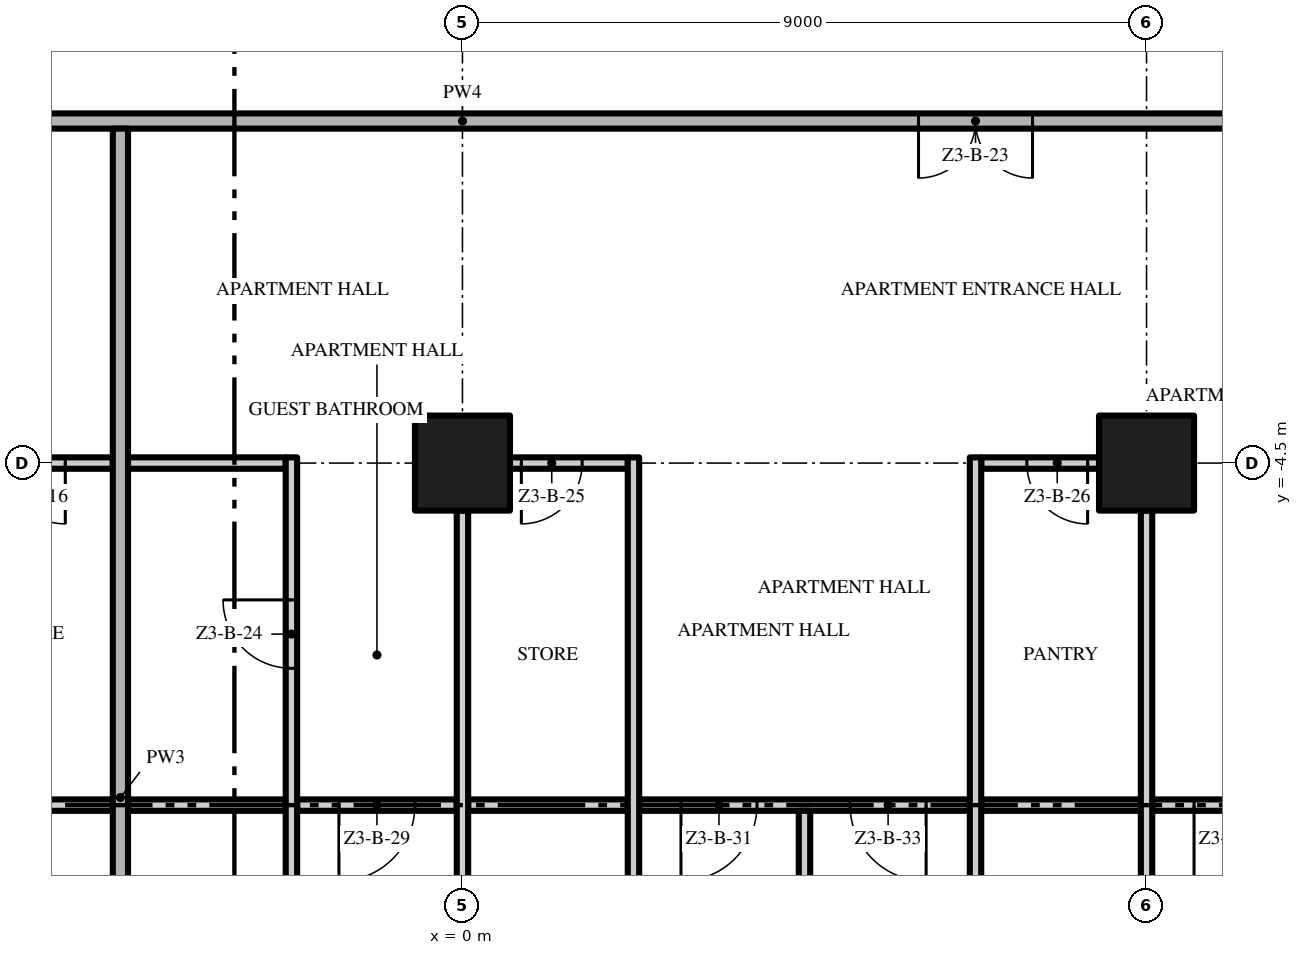
"""IFC4 building model, lengths in metres.
Left out: names, types, materials, properties, quantities, classifications, styles, units other than length and angle.
Written with IfcOpenShell. Run it as: python <this file> out.ifc"""

import sys

from ifc_helpers import new_model, si_unit, direction, frame, frame_2d, origin, origin_2d, place, context, subcontext, project, spatial, rectangle, extrude, element, fill, save


model = new_model("IFC4")
c1 = context("Model", 3, precision=1e-05, world=origin(), true_north=direction((0.0, 1.0)))
c2 = subcontext(c1, "Body", "Model", "MODEL_VIEW")
j1 = project(units=[si_unit("LENGTHUNIT", "METRE"), si_unit("PLANEANGLEUNIT", "RADIAN")], contexts=[c1])
p1 = place(None, origin())
s1 = spatial("IfcSite", under=j1, at=p1, CompositionType="ELEMENT")
p2 = place(p1, origin())
s2 = spatial("IfcBuilding", under=s1, at=p2, CompositionType="ELEMENT")
p3 = place(p2, frame((0.0, 0.0, 144.0)))
s3 = spatial("IfcBuildingStorey", under=s2, at=p3, CompositionType="ELEMENT", Elevation=144.0)
for number, where, z_axis, x_axis in (
    (1, (0.0, -4.5, 0.0), (0.0, 0.0, 1.0), (1.0, 0.0, 0.0)),
    (2, (9.0, -4.5, 0.0), (0.0, 0.0, 1.0), (1.0, 0.0, 0.0)),
):
    element("IfcColumn", number, at=place(p3, frame(where, z_axis=z_axis, x_axis=x_axis)), inside=s3, PredefinedType="COLUMN", context=c2, shape_type="SweptSolid", body=[
        extrude(rectangle(XDim=1.25, YDim=1.25, at=origin_2d()), origin(), (0.0, 0.0, 1.0), 3.5),
    ])
for number, where, z_axis, x_axis in (
    (3, (-6.675, -9.0, 0.0), (0.0, 0.0, 1.0), (1.0, 0.0, 0.0)),
    (4, (-4.4, -9.0, 0.0), (0.0, 0.0, 1.0), (1.0, 0.0, 0.0)),
):
    element("IfcWall", number, at=place(p3, frame(where, z_axis=z_axis, x_axis=x_axis)), inside=s3, PredefinedType="PARTITIONING", context=c2, shape_type="SweptSolid", body=[
        extrude(rectangle(XDim=2.075, YDim=0.15, at=frame_2d((1.038, 0.0))), origin(), (0.0, 0.0, 1.0), 3.5),
    ])
p4 = place(p3, frame((-0.075, -9.0, 0.0), z_axis=(0.0, 0.0, 1.0), x_axis=(-1.0, 0.0, 0.0)))
e5 = element("IfcWall", 5, at=p4, inside=s3, PredefinedType="PARTITIONING", context=c2, shape_type="SweptSolid", body=[
    extrude(rectangle(XDim=2.1, YDim=0.15, at=frame_2d((1.05, 0.0))), origin(), (0.0, 0.0, 1.0), 3.5),
])
p5 = place(p4, frame((0.55, 0.0, 0.0)))
e6 = element("IfcOpeningElement", 6, at=p5, cuts=e5, PredefinedType="OPENING", context=c2, shape_type="SweptSolid", body=[
    extrude(rectangle(XDim=1.0, YDim=2.4, at=frame_2d((0.5, 1.2))), frame((0.0, 0.085, 0.0), z_axis=(0.0, -1.0, 0.0), x_axis=(1.0, 0.0, 0.0)), (0.0, 0.0, 1.0), 0.17),
])
p6 = place(p3, frame((0.075, -9.0, 0.0), z_axis=(0.0, 0.0, 1.0), x_axis=(1.0, 0.0, 0.0)))
e7 = element("IfcWall", 7, at=p6, inside=s3, PredefinedType="PARTITIONING", context=c2, shape_type="SweptSolid", body=[
    extrude(rectangle(XDim=2.1, YDim=0.15, at=frame_2d((1.05, 0.0))), origin(), (0.0, 0.0, 1.0), 3.5),
])
p7 = place(p3, frame((6.675, -9.0, 0.0), z_axis=(0.0, 0.0, 1.0), x_axis=(-1.0, 0.0, 0.0)))
e8 = element("IfcWall", 8, at=p7, inside=s3, PredefinedType="PARTITIONING", context=c2, shape_type="SweptSolid", body=[
    extrude(rectangle(XDim=4.35, YDim=0.15, at=frame_2d((2.175, 0.0))), origin(), (0.0, 0.0, 1.0), 3.5),
])
p8 = place(p7, frame((2.8, 0.0, 0.0)))
e9 = element("IfcOpeningElement", 9, at=p8, cuts=e8, PredefinedType="OPENING", context=c2, shape_type="SweptSolid", body=[
    extrude(rectangle(XDim=1.0, YDim=2.4, at=frame_2d((0.5, 1.2))), frame((0.0, 0.085, 0.0), z_axis=(0.0, -1.0, 0.0), x_axis=(1.0, 0.0, 0.0)), (0.0, 0.0, 1.0), 0.17),
])
p9 = place(p7, frame((0.575, 0.0, 0.0)))
e10 = element("IfcOpeningElement", 10, at=p9, cuts=e8, PredefinedType="OPENING", context=c2, shape_type="SweptSolid", body=[
    extrude(rectangle(XDim=1.0, YDim=2.4, at=frame_2d((0.5, 1.2))), frame((0.0, 0.085, 0.0), z_axis=(0.0, -1.0, 0.0), x_axis=(1.0, 0.0, 0.0)), (0.0, 0.0, 1.0), 0.17),
])
p10 = place(p3, frame((6.825, -9.0, 0.0), z_axis=(0.0, 0.0, 1.0), x_axis=(1.0, 0.0, 0.0)))
e11 = element("IfcWall", 11, at=p10, inside=s3, PredefinedType="PARTITIONING", context=c2, shape_type="SweptSolid", body=[
    extrude(rectangle(XDim=2.1, YDim=0.15, at=frame_2d((1.05, 0.0))), origin(), (0.0, 0.0, 1.0), 3.5),
])
p11 = place(p3, frame((13.425, -9.0, 0.0), z_axis=(0.0, 0.0, 1.0), x_axis=(-1.0, 0.0, 0.0)))
e12 = element("IfcWall", 12, at=p11, inside=s3, PredefinedType="PARTITIONING", context=c2, shape_type="SweptSolid", body=[
    extrude(rectangle(XDim=4.35, YDim=0.15, at=frame_2d((2.175, 0.0))), origin(), (0.0, 0.0, 1.0), 3.5),
])
p12 = place(p11, frame((2.8, 0.0, 0.0)))
e13 = element("IfcOpeningElement", 13, at=p12, cuts=e12, PredefinedType="OPENING", context=c2, shape_type="SweptSolid", body=[
    extrude(rectangle(XDim=1.0, YDim=2.4, at=frame_2d((0.5, 1.2))), frame((0.0, 0.085, 0.0), z_axis=(0.0, -1.0, 0.0), x_axis=(1.0, 0.0, 0.0)), (0.0, 0.0, 1.0), 0.17),
])
p13 = place(p3, frame((-4.6, -4.5, 0.0), z_axis=(0.0, 0.0, 1.0), x_axis=(-1.0, 0.0, 0.0)))
e14 = element("IfcWall", 14, at=p13, inside=s3, PredefinedType="PARTITIONING", context=c2, shape_type="SweptSolid", body=[
    extrude(rectangle(XDim=2.075, YDim=0.15, at=frame_2d((1.038, 0.0))), origin(), (0.0, 0.0, 1.0), 3.5),
])
p14 = place(p13, frame((0.625, 0.0, 0.0)))
e15 = element("IfcOpeningElement", 15, at=p14, cuts=e14, PredefinedType="OPENING", context=c2, shape_type="SweptSolid", body=[
    extrude(rectangle(XDim=0.8, YDim=2.0, at=frame_2d((0.4, 1.0))), frame((0.0, 0.085, 0.0), z_axis=(0.0, -1.0, 0.0), x_axis=(1.0, 0.0, 0.0)), (0.0, 0.0, 1.0), 0.17),
])
p15 = place(p3, frame((-4.4, -4.5, 0.0), z_axis=(0.0, 0.0, 1.0), x_axis=(1.0, 0.0, 0.0)))
e16 = element("IfcWall", 16, at=p15, inside=s3, PredefinedType="PARTITIONING", context=c2, shape_type="SweptSolid", body=[
    extrude(rectangle(XDim=2.075, YDim=0.15, at=frame_2d((1.038, 0.0))), origin(), (0.0, 0.0, 1.0), 3.5),
])
p16 = place(p3, frame((2.175, -4.5, 0.0), z_axis=(0.0, 0.0, 1.0), x_axis=(-1.0, 0.0, 0.0)))
e17 = element("IfcWall", 17, at=p16, inside=s3, PredefinedType="PARTITIONING", context=c2, shape_type="SweptSolid", body=[
    extrude(rectangle(XDim=1.55, YDim=0.15, at=frame_2d((0.775, 0.0))), origin(), (0.0, 0.0, 1.0), 3.5),
])
p17 = place(p16, frame((0.6, 0.0, 0.0)))
e18 = element("IfcOpeningElement", 18, at=p17, cuts=e17, PredefinedType="OPENING", context=c2, shape_type="SweptSolid", body=[
    extrude(rectangle(XDim=0.8, YDim=2.0, at=frame_2d((0.4, 1.0))), frame((0.0, 0.085, 0.0), z_axis=(0.0, -1.0, 0.0), x_axis=(1.0, 0.0, 0.0)), (0.0, 0.0, 1.0), 0.17),
])
p18 = place(p3, frame((8.375, -4.5, 0.0), z_axis=(0.0, 0.0, 1.0), x_axis=(-1.0, 0.0, 0.0)))
e19 = element("IfcWall", 19, at=p18, inside=s3, PredefinedType="PARTITIONING", context=c2, shape_type="SweptSolid", body=[
    extrude(rectangle(XDim=1.55, YDim=0.15, at=frame_2d((0.775, 0.0))), origin(), (0.0, 0.0, 1.0), 3.5),
])
p19 = place(p18, frame((0.15, 0.0, 0.0)))
e20 = element("IfcOpeningElement", 20, at=p19, cuts=e19, PredefinedType="OPENING", context=c2, shape_type="SweptSolid", body=[
    extrude(rectangle(XDim=0.8, YDim=2.0, at=frame_2d((0.4, 1.0))), frame((0.0, 0.085, 0.0), z_axis=(0.0, -1.0, 0.0), x_axis=(1.0, 0.0, 0.0)), (0.0, 0.0, 1.0), 0.17),
])
p20 = place(p3, frame((17.5, 0.0, 0.0), z_axis=(0.0, 0.0, 1.0), x_axis=(-1.0, 0.0, 0.0)))
e21 = element("IfcWall", 21, at=p20, inside=s3, PredefinedType="PARTITIONING", context=c2, shape_type="SweptSolid", body=[
    extrude(rectangle(XDim=35.0, YDim=0.2, at=frame_2d((17.5, 0.0))), origin(), (0.0, 0.0, 1.0), 3.5),
])
p21 = place(p20, frame((28.0, 0.0, 0.0)))
e22 = element("IfcOpeningElement", 22, at=p21, cuts=e21, PredefinedType="OPENING", context=c2, shape_type="SweptSolid", body=[
    extrude(rectangle(XDim=1.5, YDim=2.4, at=frame_2d((0.75, 1.2))), frame((0.0, 0.11, 0.0), z_axis=(0.0, -1.0, 0.0), x_axis=(1.0, 0.0, 0.0)), (0.0, 0.0, 1.0), 0.22),
])
p22 = place(p20, frame((10.0, 0.0, 0.0)))
e23 = element("IfcOpeningElement", 23, at=p22, cuts=e21, PredefinedType="OPENING", context=c2, shape_type="SweptSolid", body=[
    extrude(rectangle(XDim=1.5, YDim=2.4, at=frame_2d((0.75, 1.2))), frame((0.0, 0.11, 0.0), z_axis=(0.0, -1.0, 0.0), x_axis=(1.0, 0.0, 0.0)), (0.0, 0.0, 1.0), 0.22),
])
p23 = place(p3, frame((-4.5, -17.7, 0.0), z_axis=(0.0, 0.0, 1.0), x_axis=(0.0, 1.0, 0.0)))
e24 = element("IfcWall", 24, at=p23, inside=s3, PredefinedType="PARTITIONING", context=c2, shape_type="SweptSolid", body=[
    extrude(rectangle(XDim=17.6, YDim=0.2, at=frame_2d((8.8, 0.0))), origin(), (0.0, 0.0, 1.0), 3.5),
])
p24 = place(p3, frame((-2.25, -12.075, 0.0), z_axis=(0.0, 0.0, 1.0), x_axis=(0.0, 1.0, 0.0)))
e25 = element("IfcWall", 25, at=p24, inside=s3, PredefinedType="PARTITIONING", context=c2, shape_type="SweptSolid", body=[
    extrude(rectangle(XDim=7.65, YDim=0.15, at=frame_2d((3.825, 0.0))), origin(), (0.0, 0.0, 1.0), 3.5),
])
p25 = place(p24, frame((4.875, 0.0, 0.0)))
e26 = element("IfcOpeningElement", 26, at=p25, cuts=e25, PredefinedType="OPENING", context=c2, shape_type="SweptSolid", body=[
    extrude(rectangle(XDim=0.9, YDim=2.1, at=frame_2d((0.45, 1.05))), frame((0.0, 0.085, 0.0), z_axis=(0.0, -1.0, 0.0), x_axis=(1.0, 0.0, 0.0)), (0.0, 0.0, 1.0), 0.17),
])
p26 = place(p24, frame((1.125, 0.0, 0.0)))
e27 = element("IfcOpeningElement", 27, at=p26, cuts=e25, PredefinedType="OPENING", context=c2, shape_type="SweptSolid", body=[
    extrude(rectangle(XDim=0.9, YDim=2.1, at=frame_2d((0.45, 1.05))), frame((0.0, 0.085, 0.0), z_axis=(0.0, -1.0, 0.0), x_axis=(1.0, 0.0, 0.0)), (0.0, 0.0, 1.0), 0.17),
])
p27 = place(p3, frame((0.0, -12.875, 0.0), z_axis=(0.0, 0.0, 1.0), x_axis=(0.0, 1.0, 0.0)))
e28 = element("IfcWall", 28, at=p27, inside=s3, PredefinedType="PARTITIONING", context=c2, shape_type="SweptSolid", body=[
    extrude(rectangle(XDim=7.75, YDim=0.15, at=frame_2d((3.875, 0.0))), origin(), (0.0, 0.0, 1.0), 3.5),
])
p28 = place(p3, frame((2.25, -12.075, 0.0), z_axis=(0.0, 0.0, 1.0), x_axis=(0.0, 1.0, 0.0)))
e29 = element("IfcWall", 29, at=p28, inside=s3, PredefinedType="PARTITIONING", context=c2, shape_type="SweptSolid", body=[
    extrude(rectangle(XDim=7.65, YDim=0.15, at=frame_2d((3.825, 0.0))), origin(), (0.0, 0.0, 1.0), 3.5),
])
p29 = place(p3, frame((4.5, -17.7, 0.0), z_axis=(0.0, 0.0, 1.0), x_axis=(0.0, 1.0, 0.0)))
e30 = element("IfcWall", 30, at=p29, inside=s3, PredefinedType="PARTITIONING", context=c2, shape_type="SweptSolid", body=[
    extrude(rectangle(XDim=8.625, YDim=0.15, at=frame_2d((4.312, 0.0))), origin(), (0.0, 0.0, 1.0), 3.5),
])
p30 = place(p3, frame((6.75, -12.075, 0.0), z_axis=(0.0, 0.0, 1.0), x_axis=(0.0, 1.0, 0.0)))
e31 = element("IfcWall", 31, at=p30, inside=s3, PredefinedType="PARTITIONING", context=c2, shape_type="SweptSolid", body=[
    extrude(rectangle(XDim=7.65, YDim=0.15, at=frame_2d((3.825, 0.0))), origin(), (0.0, 0.0, 1.0), 3.5),
])
p31 = place(p3, frame((9.0, -12.875, 0.0), z_axis=(0.0, 0.0, 1.0), x_axis=(0.0, 1.0, 0.0)))
e32 = element("IfcWall", 32, at=p31, inside=s3, PredefinedType="PARTITIONING", context=c2, shape_type="SweptSolid", body=[
    extrude(rectangle(XDim=7.75, YDim=0.15, at=frame_2d((3.875, 0.0))), origin(), (0.0, 0.0, 1.0), 3.5),
])
p32 = place(p14, origin())
e33 = element("IfcDoor", 33, at=p32, inside=s3, OperationType="SINGLE_SWING_LEFT", PredefinedType="DOOR", context=c2, shape_type="SweptSolid", body=[
    extrude(rectangle(XDim=0.8, YDim=2.0, at=frame_2d((0.4, 1.0))), frame((0.0, 0.025, 0.0), z_axis=(0.0, -1.0, 0.0), x_axis=(1.0, 0.0, 0.0)), (0.0, 0.0, 1.0), 0.05),
])
fill(e15, e33)
p33 = place(p22, origin())
e34 = element("IfcDoor", 34, at=p33, inside=s3, OperationType="DOUBLE_DOOR_SINGLE_SWING", PredefinedType="DOOR", context=c2, shape_type="SweptSolid", body=[
    extrude(rectangle(XDim=1.5, YDim=2.4, at=frame_2d((0.75, 1.2))), frame((0.0, 0.025, 0.0), z_axis=(0.0, -1.0, 0.0), x_axis=(1.0, 0.0, 0.0)), (0.0, 0.0, 1.0), 0.05),
])
fill(e23, e34)
p34 = place(p25, origin())
e35 = element("IfcDoor", 35, at=p34, inside=s3, OperationType="SINGLE_SWING_RIGHT", PredefinedType="DOOR", context=c2, shape_type="SweptSolid", body=[
    extrude(rectangle(XDim=0.9, YDim=2.1, at=frame_2d((0.45, 1.05))), frame((0.0, 0.025, 0.0), z_axis=(0.0, -1.0, 0.0), x_axis=(1.0, 0.0, 0.0)), (0.0, 0.0, 1.0), 0.05),
])
fill(e26, e35)
p35 = place(p17, origin())
e36 = element("IfcDoor", 36, at=p35, inside=s3, OperationType="SINGLE_SWING_RIGHT", PredefinedType="DOOR", context=c2, shape_type="SweptSolid", body=[
    extrude(rectangle(XDim=0.8, YDim=2.0, at=frame_2d((0.4, 1.0))), frame((0.0, 0.025, 0.0), z_axis=(0.0, -1.0, 0.0), x_axis=(1.0, 0.0, 0.0)), (0.0, 0.0, 1.0), 0.05),
])
fill(e18, e36)
p36 = place(p19, origin())
e37 = element("IfcDoor", 37, at=p36, inside=s3, OperationType="SINGLE_SWING_LEFT", PredefinedType="DOOR", context=c2, shape_type="SweptSolid", body=[
    extrude(rectangle(XDim=0.8, YDim=2.0, at=frame_2d((0.4, 1.0))), frame((0.0, 0.025, 0.0), z_axis=(0.0, -1.0, 0.0), x_axis=(1.0, 0.0, 0.0)), (0.0, 0.0, 1.0), 0.05),
])
fill(e20, e37)
p37 = place(p5, origin())
e38 = element("IfcDoor", 38, at=p37, inside=s3, OperationType="SINGLE_SWING_RIGHT", PredefinedType="DOOR", context=c2, shape_type="SweptSolid", body=[
    extrude(rectangle(XDim=1.0, YDim=2.4, at=frame_2d((0.5, 1.2))), frame((0.0, 0.025, 0.0), z_axis=(0.0, -1.0, 0.0), x_axis=(1.0, 0.0, 0.0)), (0.0, 0.0, 1.0), 0.05),
])
fill(e6, e38)
p38 = place(p8, origin())
e39 = element("IfcDoor", 39, at=p38, inside=s3, OperationType="SINGLE_SWING_RIGHT", PredefinedType="DOOR", context=c2, shape_type="SweptSolid", body=[
    extrude(rectangle(XDim=1.0, YDim=2.4, at=frame_2d((0.5, 1.2))), frame((0.0, 0.025, 0.0), z_axis=(0.0, -1.0, 0.0), x_axis=(1.0, 0.0, 0.0)), (0.0, 0.0, 1.0), 0.05),
])
fill(e9, e39)
p39 = place(p9, origin())
e40 = element("IfcDoor", 40, at=p39, inside=s3, OperationType="SINGLE_SWING_LEFT", PredefinedType="DOOR", context=c2, shape_type="SweptSolid", body=[
    extrude(rectangle(XDim=1.0, YDim=2.4, at=frame_2d((0.5, 1.2))), frame((0.0, 0.025, 0.0), z_axis=(0.0, -1.0, 0.0), x_axis=(1.0, 0.0, 0.0)), (0.0, 0.0, 1.0), 0.05),
])
fill(e10, e40)
p40 = place(p12, origin())
e41 = element("IfcDoor", 41, at=p40, inside=s3, OperationType="SINGLE_SWING_RIGHT", PredefinedType="DOOR", context=c2, shape_type="SweptSolid", body=[
    extrude(rectangle(XDim=1.0, YDim=2.4, at=frame_2d((0.5, 1.2))), frame((0.0, 0.025, 0.0), z_axis=(0.0, -1.0, 0.0), x_axis=(1.0, 0.0, 0.0)), (0.0, 0.0, 1.0), 0.05),
])
fill(e13, e41)
save(model, sys.argv[1])
